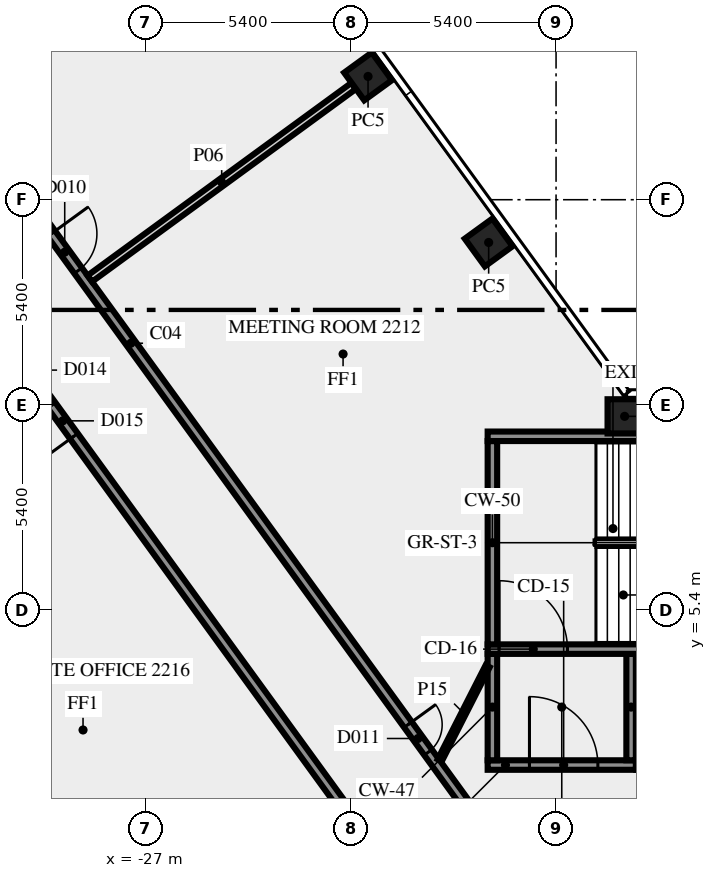
"""IFC4 building model, lengths in metres.
Left out: names, types, materials, properties, quantities, classifications, styles, units other than length and angle.
Written with IfcOpenShell. Run it as: python <this file> out.ifc"""

import sys

from ifc_helpers import new_model, si_unit, direction, frame, frame_2d, origin, origin_2d, place, context, subcontext, project, spatial, rectangle, extrude, element, fill, save


model = new_model("IFC4")
c1 = context("Model", 3, precision=1e-05, world=origin(), true_north=direction((0.0, 1.0)))
c2 = subcontext(c1, "Body", "Model", "MODEL_VIEW")
j1 = project(units=[si_unit("LENGTHUNIT", "METRE"), si_unit("PLANEANGLEUNIT", "RADIAN")], contexts=[c1])
p1 = place(None, origin())
s1 = spatial("IfcSite", under=j1, at=p1, CompositionType="ELEMENT")
p2 = place(p1, origin())
s2 = spatial("IfcBuilding", under=s1, at=p2, CompositionType="ELEMENT")
p3 = place(p2, frame((0.0, 0.0, 97.0)))
s3 = spatial("IfcBuildingStorey", under=s2, at=p3, CompositionType="ELEMENT", Elevation=97.0)
for number, where, z_axis, x_axis in (
    (1, (-17.974, 15.075, 0.0), (0.0, 0.0, 1.0), (-0.588, 0.809, 0.0)),
    (2, (-21.147, 19.444, 0.0), (0.0, 0.0, 1.0), (-0.588, 0.809, 0.0)),
    (3, (-14.395, 10.5, 0.0), (0.0, 0.0, 1.0), (-1.0, 0.0, 0.0)),
):
    element("IfcColumn", number, at=place(p3, frame(where, z_axis=z_axis, x_axis=x_axis)), inside=s3, PredefinedType="COLUMN", context=c2, shape_type="SweptSolid", body=[
        extrude(rectangle(XDim=0.9, YDim=0.9, at=origin_2d()), origin(), (0.0, 0.0, 1.0), 3.65),
    ])
p4 = place(p3, frame((-18.0, 1.325, 0.0), z_axis=(0.0, 0.0, 1.0), x_axis=(1.0, 0.0, 0.0)))
e4 = element("IfcWall", 4, at=p4, inside=s3, PredefinedType="SHEAR", context=c2, shape_type="SweptSolid", body=[
    extrude(rectangle(XDim=3.9, YDim=0.25, at=frame_2d((1.95, 0.0))), origin(), (0.0, 0.0, 1.0), 3.65),
])
p5 = place(p4, frame((1.1, 0.0, 0.0)))
e5 = element("IfcOpeningElement", 5, at=p5, cuts=e4, PredefinedType="OPENING", context=c2, shape_type="SweptSolid", body=[
    extrude(rectangle(XDim=1.8, YDim=2.1, at=frame_2d((0.9, 1.05))), frame((0.0, 0.135, 0.0), z_axis=(0.0, -1.0, 0.0), x_axis=(1.0, 0.0, 0.0)), (0.0, 0.0, 1.0), 0.27),
])
for number, where, z_axis, x_axis in (
    (6, (-17.875, 1.45, 0.0), (0.0, 0.0, 1.0), (0.0, 1.0, 0.0)),
    (7, (-14.225, 1.45, 0.0), (0.0, 0.0, 1.0), (0.0, 1.0, 0.0)),
):
    element("IfcWall", number, at=place(p3, frame(where, z_axis=z_axis, x_axis=x_axis)), inside=s3, PredefinedType="SHEAR", context=c2, shape_type="SweptSolid", body=[
        extrude(rectangle(XDim=2.8, YDim=0.25, at=frame_2d((1.4, 0.0))), origin(), (0.0, 0.0, 1.0), 3.65),
    ])
p6 = place(p3, frame((-18.0, 4.375, 0.0), z_axis=(0.0, 0.0, 1.0), x_axis=(1.0, 0.0, 0.0)))
e8 = element("IfcWall", 8, at=p6, inside=s3, PredefinedType="SHEAR", context=c2, shape_type="SweptSolid", body=[
    extrude(rectangle(XDim=10.5, YDim=0.25, at=frame_2d((5.25, 0.0))), origin(), (0.0, 0.0, 1.0), 3.65),
])
p7 = place(p6, frame((0.3, 0.0, 0.0)))
e9 = element("IfcOpeningElement", 9, at=p7, cuts=e8, PredefinedType="OPENING", context=c2, shape_type="SweptSolid", body=[
    extrude(rectangle(XDim=1.8, YDim=2.1, at=frame_2d((0.9, 1.05))), frame((0.0, 0.135, 0.0), z_axis=(0.0, -1.0, 0.0), x_axis=(1.0, 0.0, 0.0)), (0.0, 0.0, 1.0), 0.27),
])
p8 = place(p3, frame((-17.875, 4.5, 0.0), z_axis=(0.0, 0.0, 1.0), x_axis=(0.0, 1.0, 0.0)))
e10 = element("IfcWall", 10, at=p8, inside=s3, PredefinedType="SHEAR", context=c2, shape_type="SweptSolid", body=[
    extrude(rectangle(XDim=5.35, YDim=0.25, at=frame_2d((2.675, 0.0))), origin(), (0.0, 0.0, 1.0), 3.65),
])
p9 = place(p3, frame((-18.0, 9.975, 0.0), z_axis=(0.0, 0.0, 1.0), x_axis=(1.0, 0.0, 0.0)))
e11 = element("IfcWall", 11, at=p9, inside=s3, PredefinedType="SHEAR", context=c2, shape_type="SweptSolid", body=[
    extrude(rectangle(XDim=10.5, YDim=0.25, at=frame_2d((5.25, 0.0))), origin(), (0.0, 0.0, 1.0), 3.65),
])
p10 = place(p9, frame((4.5, 0.0, 1.0)))
e12 = element("IfcOpeningElement", 12, at=p10, cuts=e11, PredefinedType="OPENING", context=c2, shape_type="SweptSolid", body=[
    extrude(rectangle(XDim=1.2, YDim=1.2, at=frame_2d((0.6, 0.6))), frame((0.0, 0.135, 0.0), z_axis=(0.0, -1.0, 0.0), x_axis=(1.0, 0.0, 0.0)), (0.0, 0.0, 1.0), 0.27),
])
p11 = place(p3, frame((-20.531, -1.523, 0.0), z_axis=(0.0, 0.0, 1.0), x_axis=(-0.587784593204, 0.809017473231, 0.0)))
e13 = element("IfcWall", 13, at=p11, inside=s3, PredefinedType="SOLIDWALL", context=c2, shape_type="SweptSolid", body=[
    extrude(rectangle(XDim=44.67, YDim=0.25, at=frame_2d((22.335, 0.0))), origin(), (0.0, 0.0, 1.0), 3.65),
])
p12 = place(p11, frame((43.296, 0.0, 0.0)))
e14 = element("IfcOpeningElement", 14, at=p12, cuts=e13, PredefinedType="OPENING", context=c2, shape_type="SweptSolid", body=[
    extrude(rectangle(XDim=0.9, YDim=2.1, at=frame_2d((0.45, 1.05))), frame((0.0, 0.135, 0.0), z_axis=(0.0, -1.0, 0.0), x_axis=(1.0, 0.0, 0.0)), (0.0, 0.0, 1.0), 0.27),
])
p13 = place(p11, frame((15.916, 0.0, 0.0)))
e15 = element("IfcOpeningElement", 15, at=p13, cuts=e13, PredefinedType="OPENING", context=c2, shape_type="SweptSolid", body=[
    extrude(rectangle(XDim=0.9, YDim=2.1, at=frame_2d((0.45, 1.05))), frame((0.0, 0.135, 0.0), z_axis=(0.0, -1.0, 0.0), x_axis=(1.0, 0.0, 0.0)), (0.0, 0.0, 1.0), 0.27),
])
p14 = place(p11, frame((33.116, 0.0, 0.0)))
e16 = element("IfcOpeningElement", 16, at=p14, cuts=e13, PredefinedType="OPENING", context=c2, shape_type="SweptSolid", body=[
    extrude(rectangle(XDim=1.0, YDim=2.1, at=frame_2d((0.5, 1.05))), frame((0.0, 0.135, 0.0), z_axis=(0.0, -1.0, 0.0), x_axis=(1.0, 0.0, 0.0)), (0.0, 0.0, 1.0), 0.27),
])
p15 = place(p11, frame((14.216, 0.0, 0.0)))
e17 = element("IfcOpeningElement", 17, at=p15, cuts=e13, PredefinedType="OPENING", context=c2, shape_type="SweptSolid", body=[
    extrude(rectangle(XDim=1.0, YDim=2.1, at=frame_2d((0.5, 1.05))), frame((0.0, 0.135, 0.0), z_axis=(0.0, -1.0, 0.0), x_axis=(1.0, 0.0, 0.0)), (0.0, 0.0, 1.0), 0.27),
])
p16 = place(p3, frame((-37.232, 25.972, 0.0), z_axis=(0.0, 0.0, 1.0), x_axis=(0.587786323093, -0.809016216391, 0.0)))
e18 = element("IfcWall", 18, at=p16, inside=s3, PredefinedType="SOLIDWALL", context=c2, shape_type="SweptSolid", body=[
    extrude(rectangle(XDim=33.493, YDim=0.25, at=frame_2d((16.747, 0.0))), origin(), (0.0, 0.0, 1.0), 3.65),
])
p17 = place(p16, frame((13.185, 0.0, 0.0)))
e19 = element("IfcOpeningElement", 19, at=p17, cuts=e18, PredefinedType="OPENING", context=c2, shape_type="SweptSolid", body=[
    extrude(rectangle(XDim=1.2, YDim=2.1, at=frame_2d((0.6, 1.05))), frame((0.0, 0.135, 0.0), z_axis=(0.0, -1.0, 0.0), x_axis=(1.0, 0.0, 0.0)), (0.0, 0.0, 1.0), 0.27),
])
p18 = place(p16, frame((29.152, 0.0, 0.0)))
e20 = element("IfcOpeningElement", 20, at=p18, cuts=e18, PredefinedType="OPENING", context=c2, shape_type="SweptSolid", body=[
    extrude(rectangle(XDim=0.9, YDim=2.1, at=frame_2d((0.45, 1.05))), frame((0.0, 0.135, 0.0), z_axis=(0.0, -1.0, 0.0), x_axis=(1.0, 0.0, 0.0)), (0.0, 0.0, 1.0), 0.27),
])
p19 = place(p3, frame((-28.469, 14.124, 0.0), z_axis=(0.0, 0.0, 1.0), x_axis=(0.807597163234, 0.589734535139, 0.0)))
e21 = element("IfcWall", 21, at=p19, inside=s3, PredefinedType="SOLIDWALL", context=c2, shape_type="SweptSolid", body=[
    extrude(rectangle(XDim=8.595, YDim=0.2, at=frame_2d((4.298, 0.0))), origin(), (0.0, 0.0, 1.0), 3.65),
])
p20 = place(p3, frame((-19.261, 1.45, 0.0), z_axis=(0.0, 0.0, 1.0), x_axis=(0.453950796792, 0.891026752736, 0.0)))
e22 = element("IfcWall", 22, at=p20, inside=s3, PredefinedType="PARTITIONING", context=c2, shape_type="SweptSolid", body=[
    extrude(rectangle(XDim=2.778, YDim=0.12, at=frame_2d((1.389, 0.0))), origin(), (0.0, 0.0, 1.0), 3.65),
])
p21 = place(p5, origin())
e23 = element("IfcDoor", 23, at=p21, inside=s3, OperationType="DOUBLE_DOOR_SINGLE_SWING", PredefinedType="DOOR", context=c2, shape_type="SweptSolid", body=[
    extrude(rectangle(XDim=1.8, YDim=2.1, at=frame_2d((0.9, 1.05))), frame((0.0, 0.025, 0.0), z_axis=(0.0, -1.0, 0.0), x_axis=(1.0, 0.0, 0.0)), (0.0, 0.0, 1.0), 0.05),
])
fill(e5, e23)
p22 = place(p7, origin())
e24 = element("IfcDoor", 24, at=p22, inside=s3, OperationType="DOUBLE_DOOR_SINGLE_SWING", PredefinedType="DOOR", context=c2, shape_type="SweptSolid", body=[
    extrude(rectangle(XDim=1.8, YDim=2.1, at=frame_2d((0.9, 1.05))), frame((0.0, 0.025, 0.0), z_axis=(0.0, -1.0, 0.0), x_axis=(1.0, 0.0, 0.0)), (0.0, 0.0, 1.0), 0.05),
])
fill(e9, e24)
p23 = place(p17, origin())
e25 = element("IfcDoor", 25, at=p23, inside=s3, OperationType="SINGLE_SWING_RIGHT", PredefinedType="DOOR", context=c2, shape_type="SweptSolid", body=[
    extrude(rectangle(XDim=1.2, YDim=2.1, at=frame_2d((0.6, 1.05))), frame((0.0, 0.025, 0.0), z_axis=(0.0, -1.0, 0.0), x_axis=(1.0, 0.0, 0.0)), (0.0, 0.0, 1.0), 0.05),
])
fill(e19, e25)
p24 = place(p15, origin())
e26 = element("IfcDoor", 26, at=p24, inside=s3, OperationType="SINGLE_SWING_RIGHT", PredefinedType="DOOR", context=c2, shape_type="SweptSolid", body=[
    extrude(rectangle(XDim=1.0, YDim=2.1, at=frame_2d((0.5, 1.05))), frame((0.0, 0.025, 0.0), z_axis=(0.0, -1.0, 0.0), x_axis=(1.0, 0.0, 0.0)), (0.0, 0.0, 1.0), 0.05),
])
fill(e17, e26)
p25 = place(p18, origin())
e27 = element("IfcDoor", 27, at=p25, inside=s3, OperationType="SINGLE_SWING_RIGHT", PredefinedType="DOOR", context=c2, shape_type="SweptSolid", body=[
    extrude(rectangle(XDim=0.9, YDim=2.1, at=frame_2d((0.45, 1.05))), frame((0.0, 0.025, 0.0), z_axis=(0.0, -1.0, 0.0), x_axis=(1.0, 0.0, 0.0)), (0.0, 0.0, 1.0), 0.05),
])
fill(e20, e27)
save(model, sys.argv[1])
